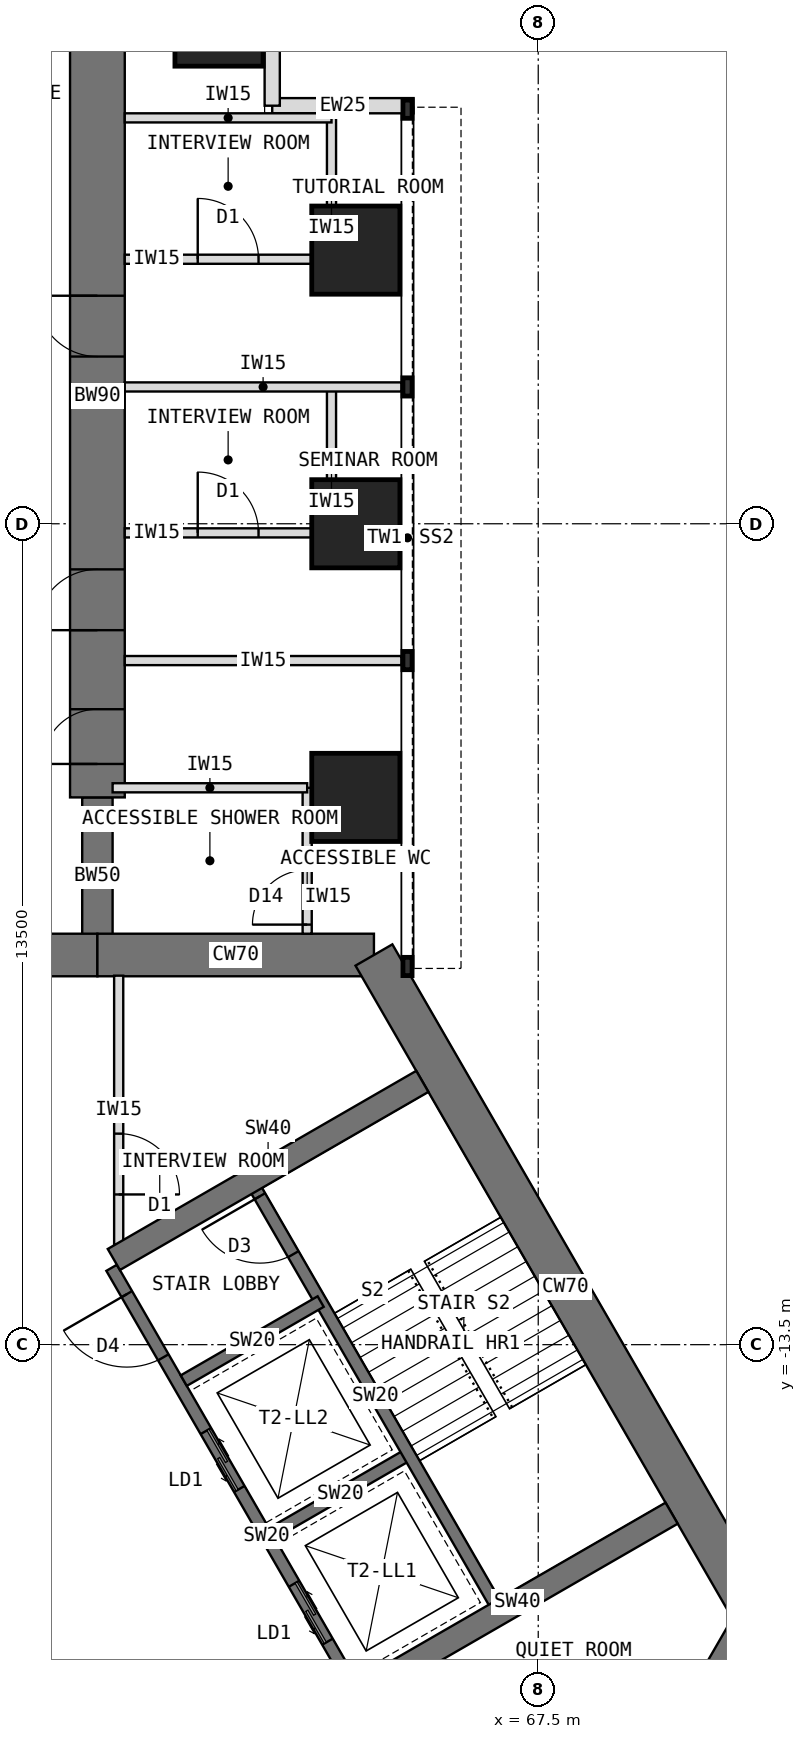
"""IFC4 building model, lengths in metres.
Left out: names, types, materials, properties, quantities, classifications, styles, units other than length and angle.
Written with IfcOpenShell. Run it as: python <this file> out.ifc"""

import sys

from ifc_helpers import new_model, si_unit, direction, frame, frame_2d, origin, origin_2d, place, context, subcontext, project, spatial, rectangle, extrude, element, fill, save


model = new_model("IFC4")
c1 = context("Model", 3, precision=1e-05, world=origin(), true_north=direction((0.0, 1.0)))
c2 = subcontext(c1, "Body", "Model", "MODEL_VIEW")
j1 = project(units=[si_unit("LENGTHUNIT", "METRE"), si_unit("PLANEANGLEUNIT", "RADIAN")], contexts=[c1])
p1 = place(None, origin())
s1 = spatial("IfcSite", under=j1, at=p1, CompositionType="ELEMENT")
p2 = place(p1, origin())
s2 = spatial("IfcBuilding", under=s1, at=p2, CompositionType="ELEMENT")
p3 = place(p2, frame((0.0, 0.0, 68.5)))
s3 = spatial("IfcBuildingStorey", under=s2, at=p3, CompositionType="ELEMENT", Elevation=68.5)
p4 = place(p3, frame((64.798, -7.092, 0.0), z_axis=(0.0, 0.0, 1.0), x_axis=(-1.0, 0.0, 0.0)))
e1 = element("IfcWall", 1, at=p4, inside=s3, PredefinedType="SHEAR", context=c2, shape_type="SweptSolid", body=[
    extrude(rectangle(XDim=4.548, YDim=0.7, at=frame_2d((2.274, 0.0))), origin(), (0.0, 0.0, 1.0), 4.0),
])
p5 = place(p3, frame((60.25, -7.092, 0.0), z_axis=(0.0, 0.0, 1.0), x_axis=(-1.0, 0.0, 0.0)))
e2 = element("IfcWall", 2, at=p5, inside=s3, PredefinedType="SHEAR", context=c2, shape_type="SweptSolid", body=[
    extrude(rectangle(XDim=3.5, YDim=0.7, at=frame_2d((1.75, 0.0))), origin(), (0.0, 0.0, 1.0), 4.0),
])
p6 = place(p5, frame((0.85, 0.0, 0.0)))
e3 = element("IfcOpeningElement", 3, at=p6, cuts=e2, PredefinedType="OPENING", context=c2, shape_type="SweptSolid", body=[
    extrude(rectangle(XDim=1.8, YDim=2.1, at=frame_2d((0.9, 1.05))), frame((0.0, 0.36, 0.0), z_axis=(0.0, -1.0, 0.0), x_axis=(1.0, 0.0, 0.0)), (0.0, 0.0, 1.0), 0.72),
])
p7 = place(p3, frame((68.822, -21.939, 0.0), z_axis=(0.0, 0.0, 1.0), x_axis=(0.500024481964, 0.866011268655, 0.0)))
e4 = element("IfcWall", 4, at=p7, inside=s3, PredefinedType="SHEAR", context=c2, shape_type="SweptSolid", body=[
    extrude(rectangle(XDim=4.548, YDim=0.7, at=frame_2d((2.274, 0.0))), origin(), (0.0, 0.0, 1.0), 4.0),
])
p8 = place(p3, frame((71.096, -18.0, 0.0), z_axis=(0.0, 0.0, 1.0), x_axis=(-0.500005998175, 0.866021940709, 0.0)))
e5 = element("IfcWall", 5, at=p8, inside=s3, PredefinedType="SHEAR", context=c2, shape_type="SweptSolid", body=[
    extrude(rectangle(XDim=12.596, YDim=0.7, at=frame_2d((6.298, 0.0))), origin(), (0.0, 0.0, 1.0), 4.0),
])
p9 = place(p3, frame((60.25, -7.092, 0.0), z_axis=(0.0, 0.0, 1.0), x_axis=(0.0, 1.0, 0.0)))
e6 = element("IfcWall", 6, at=p9, inside=s3, PredefinedType="SHEAR", context=c2, shape_type="SweptSolid", body=[
    extrude(rectangle(XDim=2.592, YDim=0.5, at=frame_2d((1.296, 0.0))), origin(), (0.0, 0.0, 1.0), 4.0),
])
p10 = place(p3, frame((60.25, -4.5, 0.0), z_axis=(0.0, 0.0, 1.0), x_axis=(0.0, 1.0, 0.0)))
e7 = element("IfcWall", 7, at=p10, inside=s3, PredefinedType="SHEAR", context=c2, shape_type="SweptSolid", body=[
    extrude(rectangle(XDim=13.2, YDim=0.9, at=frame_2d((6.6, 0.0))), origin(), (0.0, 0.0, 1.0), 4.0),
])
p11 = place(p10, frame((0.55, 0.0, 0.0)))
e8 = element("IfcOpeningElement", 8, at=p11, cuts=e7, PredefinedType="OPENING", context=c2, shape_type="SweptSolid", body=[
    extrude(rectangle(XDim=0.9, YDim=2.1, at=frame_2d((0.45, 1.05))), frame((0.0, 0.46, 0.0), z_axis=(0.0, -1.0, 0.0), x_axis=(1.0, 0.0, 0.0)), (0.0, 0.0, 1.0), 0.92),
])
p12 = place(p10, frame((2.75, 0.0, 0.0)))
e9 = element("IfcOpeningElement", 9, at=p12, cuts=e7, PredefinedType="OPENING", context=c2, shape_type="SweptSolid", body=[
    extrude(rectangle(XDim=1.0, YDim=2.1, at=frame_2d((0.5, 1.05))), frame((0.0, 0.46, 0.0), z_axis=(0.0, -1.0, 0.0), x_axis=(1.0, 0.0, 0.0)), (0.0, 0.0, 1.0), 0.92),
])
p13 = place(p10, frame((7.25, 0.0, 0.0)))
e10 = element("IfcOpeningElement", 10, at=p13, cuts=e7, PredefinedType="OPENING", context=c2, shape_type="SweptSolid", body=[
    extrude(rectangle(XDim=1.0, YDim=2.1, at=frame_2d((0.5, 1.05))), frame((0.0, 0.46, 0.0), z_axis=(0.0, -1.0, 0.0), x_axis=(1.0, 0.0, 0.0)), (0.0, 0.0, 1.0), 0.92),
])
for number, where, z_axis, x_axis in (
    (11, (64.5, -4.5, 0.0), (0.0, 0.0, 1.0), (1.0, 0.0, 0.0)),
    (12, (64.5, 0.0, 0.0), (0.0, 0.0, 1.0), (1.0, 0.0, 0.0)),
    (13, (64.5, 4.5, 0.0), (0.0, 0.0, 1.0), (1.0, 0.0, 0.0)),
    (14, (62.25, 8.25, 0.0), (0.0, 0.0, 1.0), (1.0, 0.0, 0.0)),
):
    element("IfcColumn", number, at=place(p3, frame(where, z_axis=z_axis, x_axis=x_axis)), inside=s3, PredefinedType="COLUMN", context=c2, shape_type="SweptSolid", body=[
        extrude(rectangle(XDim=1.45, YDim=1.45, at=origin_2d()), origin(), (0.0, 0.0, 1.0), 4.0),
    ])
for number, where, z_axis, x_axis in (
    (15, (65.45, 6.875, 0.0), (0.0, 0.0, 1.0), (-1.0, 0.0, 0.0)),
    (16, (63.125, 6.875, 0.0), (0.0, 0.0, 1.0), (0.0, 1.0, 0.0)),
):
    element("IfcWall", number, at=place(p3, frame(where, z_axis=z_axis, x_axis=x_axis)), inside=s3, PredefinedType="STANDARD", context=c2, shape_type="SweptSolid", body=[
        extrude(rectangle(XDim=2.325, YDim=0.25, at=frame_2d((1.163, 0.0))), origin(), (0.0, 0.0, 1.0), 3.8),
    ])
p14 = place(p3, frame((64.484, -19.164, 0.0), z_axis=(0.0, 0.0, 1.0), x_axis=(-0.49999894854, 0.866026010844, 0.0)))
e17 = element("IfcWall", 17, at=p14, inside=s3, PredefinedType="SHEAR", context=c2, shape_type="SweptSolid", body=[
    extrude(rectangle(XDim=8.0, YDim=0.2, at=frame_2d((4.0, 0.0))), origin(), (0.0, 0.0, 1.0), 4.0),
])
p15 = place(p14, frame((6.3, 0.0, 0.0)))
e18 = element("IfcOpeningElement", 18, at=p15, cuts=e17, PredefinedType="OPENING", context=c2, shape_type="SweptSolid", body=[
    extrude(rectangle(XDim=1.2, YDim=2.1, at=frame_2d((0.6, 1.05))), frame((0.0, 0.11, 0.0), z_axis=(0.0, -1.0, 0.0), x_axis=(1.0, 0.0, 0.0)), (0.0, 0.0, 1.0), 0.22),
])
p16 = place(p14, frame((0.9, 0.0, 0.0)))
e19 = element("IfcOpeningElement", 19, at=p16, cuts=e17, PredefinedType="OPENING", context=c2, shape_type="SweptSolid", body=[
    extrude(rectangle(XDim=1.1, YDim=2.2, at=frame_2d((0.55, 1.1))), frame((0.0, 0.11, 0.0), z_axis=(0.0, -1.0, 0.0), x_axis=(1.0, 0.0, 0.0)), (0.0, 0.0, 1.0), 0.22),
])
p17 = place(p14, frame((3.8, 0.0, 0.0)))
e20 = element("IfcOpeningElement", 20, at=p17, cuts=e17, PredefinedType="OPENING", context=c2, shape_type="SweptSolid", body=[
    extrude(rectangle(XDim=1.1, YDim=2.2, at=frame_2d((0.55, 1.1))), frame((0.0, 0.11, 0.0), z_axis=(0.0, -1.0, 0.0), x_axis=(1.0, 0.0, 0.0)), (0.0, 0.0, 1.0), 0.22),
])
p18 = place(p3, frame((63.12, -16.603, 0.0), z_axis=(0.0, 0.0, 1.0), x_axis=(0.866062058628, 0.499936506574, 0.0)))
e21 = element("IfcWall", 21, at=p18, inside=s3, PredefinedType="SHEAR", context=c2, shape_type="SweptSolid", body=[
    extrude(rectangle(XDim=2.6, YDim=0.2, at=frame_2d((1.3, 0.0))), origin(), (0.0, 0.0, 1.0), 4.0),
])
p19 = place(p3, frame((61.67, -14.091, 0.0), z_axis=(0.0, 0.0, 1.0), x_axis=(0.86603858612, 0.49997716683, 0.0)))
e22 = element("IfcWall", 22, at=p19, inside=s3, PredefinedType="SHEAR", context=c2, shape_type="SweptSolid", body=[
    extrude(rectangle(XDim=2.6, YDim=0.2, at=frame_2d((1.3, 0.0))), origin(), (0.0, 0.0, 1.0), 4.0),
])
p20 = place(p3, frame((66.822, -17.814, 0.0), z_axis=(0.0, 0.0, 1.0), x_axis=(-0.49999894854, 0.866026010844, 0.0)))
e23 = element("IfcWall", 23, at=p20, inside=s3, PredefinedType="SHEAR", context=c2, shape_type="SweptSolid", body=[
    extrude(rectangle(XDim=8.0, YDim=0.2, at=frame_2d((4.0, 0.0))), origin(), (0.0, 0.0, 1.0), 4.0),
])
p21 = place(p20, frame((6.7, 0.0, 0.0)))
e24 = element("IfcOpeningElement", 24, at=p21, cuts=e23, PredefinedType="OPENING", context=c2, shape_type="SweptSolid", body=[
    extrude(rectangle(XDim=1.1, YDim=2.1, at=frame_2d((0.55, 1.05))), frame((0.0, 0.11, 0.0), z_axis=(0.0, -1.0, 0.0), x_axis=(1.0, 0.0, 0.0)), (0.0, 0.0, 1.0), 0.22),
])
for number, where, z_axis, x_axis in (
    (25, (60.52, -12.099, 0.0), (0.0, 0.0, 1.0), (0.866, 0.5, 0.0)),
    (26, (64.62, -19.201, 0.0), (0.0, 0.0, 1.0), (0.866, 0.5, 0.0)),
):
    element("IfcWall", number, at=place(p3, frame(where, z_axis=z_axis, x_axis=x_axis)), inside=s3, PredefinedType="SHEAR", context=c2, shape_type="SweptSolid", body=[
        extrude(rectangle(XDim=5.858, YDim=0.4, at=frame_2d((2.929, 0.0))), origin(), (0.0, 0.0, 1.0), 4.0),
    ])
for number, where, z_axis, x_axis in (
    (27, (60.7, -2.25, 0.0), (0.0, 0.0, 1.0), (1.0, 0.0, 0.0)),
    (28, (60.7, 2.25, 0.0), (0.0, 0.0, 1.0), (1.0, 0.0, 0.0)),
):
    element("IfcWall", number, at=place(p3, frame(where, z_axis=z_axis, x_axis=x_axis)), inside=s3, PredefinedType="PARTITIONING", context=c2, shape_type="SweptSolid", body=[
        extrude(rectangle(XDim=4.55, YDim=0.15, at=frame_2d((2.275, 0.0))), origin(), (0.0, 0.0, 1.0), 3.8),
    ])
p22 = place(p3, frame((64.1, -0.15, 0.0), z_axis=(0.0, 0.0, 1.0), x_axis=(0.0, 1.0, 0.0)))
e29 = element("IfcWall", 29, at=p22, inside=s3, PredefinedType="PARTITIONING", context=c2, shape_type="SweptSolid", body=[
    extrude(rectangle(XDim=2.4, YDim=0.15, at=frame_2d((1.2, 0.0))), origin(), (0.0, 0.0, 1.0), 3.8),
])
p23 = place(p3, frame((60.7, -0.15, 0.0), z_axis=(0.0, 0.0, 1.0), x_axis=(1.0, 0.0, 0.0)))
e30 = element("IfcWall", 30, at=p23, inside=s3, PredefinedType="PARTITIONING", context=c2, shape_type="SweptSolid", body=[
    extrude(rectangle(XDim=3.4, YDim=0.15, at=frame_2d((1.7, 0.0))), origin(), (0.0, 0.0, 1.0), 3.8),
])
p24 = place(p23, frame((1.2, 0.0, 0.0)))
e31 = element("IfcOpeningElement", 31, at=p24, cuts=e30, PredefinedType="OPENING", context=c2, shape_type="SweptSolid", body=[
    extrude(rectangle(XDim=1.0, YDim=2.1, at=frame_2d((0.5, 1.05))), frame((0.0, 0.085, 0.0), z_axis=(0.0, -1.0, 0.0), x_axis=(1.0, 0.0, 0.0)), (0.0, 0.0, 1.0), 0.17),
])
p25 = place(p3, frame((64.1, 4.35, 0.0), z_axis=(0.0, 0.0, 1.0), x_axis=(0.0, 1.0, 0.0)))
e32 = element("IfcWall", 32, at=p25, inside=s3, PredefinedType="PARTITIONING", context=c2, shape_type="SweptSolid", body=[
    extrude(rectangle(XDim=2.4, YDim=0.15, at=frame_2d((1.2, 0.0))), origin(), (0.0, 0.0, 1.0), 3.8),
])
p26 = place(p3, frame((60.7, 4.35, 0.0), z_axis=(0.0, 0.0, 1.0), x_axis=(1.0, 0.0, 0.0)))
e33 = element("IfcWall", 33, at=p26, inside=s3, PredefinedType="PARTITIONING", context=c2, shape_type="SweptSolid", body=[
    extrude(rectangle(XDim=3.4, YDim=0.15, at=frame_2d((1.7, 0.0))), origin(), (0.0, 0.0, 1.0), 3.8),
])
p27 = place(p26, frame((1.2, 0.0, 0.0)))
e34 = element("IfcOpeningElement", 34, at=p27, cuts=e33, PredefinedType="OPENING", context=c2, shape_type="SweptSolid", body=[
    extrude(rectangle(XDim=1.0, YDim=2.1, at=frame_2d((0.5, 1.05))), frame((0.0, 0.085, 0.0), z_axis=(0.0, -1.0, 0.0), x_axis=(1.0, 0.0, 0.0)), (0.0, 0.0, 1.0), 0.17),
])
p28 = place(p3, frame((60.7, 6.675, 0.0), z_axis=(0.0, 0.0, 1.0), x_axis=(1.0, 0.0, 0.0)))
e35 = element("IfcWall", 35, at=p28, inside=s3, PredefinedType="PARTITIONING", context=c2, shape_type="SweptSolid", body=[
    extrude(rectangle(XDim=3.4, YDim=0.15, at=frame_2d((1.7, 0.0))), origin(), (0.0, 0.0, 1.0), 3.8),
])
p29 = place(p3, frame((63.7, -6.742, 0.0), z_axis=(0.0, 0.0, 1.0), x_axis=(0.0, 1.0, 0.0)))
e36 = element("IfcWall", 36, at=p29, inside=s3, PredefinedType="PARTITIONING", context=c2, shape_type="SweptSolid", body=[
    extrude(rectangle(XDim=2.4, YDim=0.15, at=frame_2d((1.2, 0.0))), origin(), (0.0, 0.0, 1.0), 3.8),
])
p30 = place(p29, frame((0.15, 0.0, 0.0)))
e37 = element("IfcOpeningElement", 37, at=p30, cuts=e36, PredefinedType="OPENING", context=c2, shape_type="SweptSolid", body=[
    extrude(rectangle(XDim=0.9, YDim=2.1, at=frame_2d((0.45, 1.05))), frame((0.0, 0.085, 0.0), z_axis=(0.0, -1.0, 0.0), x_axis=(1.0, 0.0, 0.0)), (0.0, 0.0, 1.0), 0.17),
])
p31 = place(p3, frame((60.5, -4.342, 0.0), z_axis=(0.0, 0.0, 1.0), x_axis=(1.0, 0.0, 0.0)))
e38 = element("IfcWall", 38, at=p31, inside=s3, PredefinedType="PARTITIONING", context=c2, shape_type="SweptSolid", body=[
    extrude(rectangle(XDim=3.2, YDim=0.15, at=frame_2d((1.6, 0.0))), origin(), (0.0, 0.0, 1.0), 3.8),
])
p32 = place(p3, frame((60.6, -7.432, 0.0), z_axis=(0.0, 0.0, 1.0), x_axis=(0.0, -1.0, 0.0)))
e39 = element("IfcWall", 39, at=p32, inside=s3, PredefinedType="PARTITIONING", context=c2, shape_type="SweptSolid", body=[
    extrude(rectangle(XDim=4.426, YDim=0.15, at=frame_2d((2.213, 0.0))), origin(), (0.0, 0.0, 1.0), 3.8),
])
p33 = place(p32, frame((2.598, 0.0, 0.0)))
e40 = element("IfcOpeningElement", 40, at=p33, cuts=e39, PredefinedType="OPENING", context=c2, shape_type="SweptSolid", body=[
    extrude(rectangle(XDim=1.0, YDim=2.1, at=frame_2d((0.5, 1.05))), frame((0.0, 0.085, 0.0), z_axis=(0.0, -1.0, 0.0), x_axis=(1.0, 0.0, 0.0)), (0.0, 0.0, 1.0), 0.17),
])
p34 = place(p15, origin())
e41 = element("IfcDoor", 41, at=p34, inside=s3, OperationType="SINGLE_SWING_RIGHT", PredefinedType="DOOR", context=c2, shape_type="SweptSolid", body=[
    extrude(rectangle(XDim=1.2, YDim=2.1, at=frame_2d((0.6, 1.05))), frame((0.0, 0.025, 0.0), z_axis=(0.0, -1.0, 0.0), x_axis=(1.0, 0.0, 0.0)), (0.0, 0.0, 1.0), 0.05),
])
fill(e18, e41)
p35 = place(p16, origin())
e42 = element("IfcDoor", 42, at=p35, inside=s3, OperationType="DOUBLE_DOOR_SLIDING", PredefinedType="DOOR", context=c2, shape_type="SweptSolid", body=[
    extrude(rectangle(XDim=1.1, YDim=2.2, at=frame_2d((0.55, 1.1))), frame((0.0, 0.025, 0.0), z_axis=(0.0, -1.0, 0.0), x_axis=(1.0, 0.0, 0.0)), (0.0, 0.0, 1.0), 0.05),
])
fill(e19, e42)
p36 = place(p17, origin())
e43 = element("IfcDoor", 43, at=p36, inside=s3, OperationType="DOUBLE_DOOR_SLIDING", PredefinedType="DOOR", context=c2, shape_type="SweptSolid", body=[
    extrude(rectangle(XDim=1.1, YDim=2.2, at=frame_2d((0.55, 1.1))), frame((0.0, 0.025, 0.0), z_axis=(0.0, -1.0, 0.0), x_axis=(1.0, 0.0, 0.0)), (0.0, 0.0, 1.0), 0.05),
])
fill(e20, e43)
p37 = place(p21, origin())
e44 = element("IfcDoor", 44, at=p37, inside=s3, OperationType="SINGLE_SWING_RIGHT", PredefinedType="DOOR", context=c2, shape_type="SweptSolid", body=[
    extrude(rectangle(XDim=1.1, YDim=2.1, at=frame_2d((0.55, 1.05))), frame((0.0, 0.025, 0.0), z_axis=(0.0, -1.0, 0.0), x_axis=(1.0, 0.0, 0.0)), (0.0, 0.0, 1.0), 0.05),
])
fill(e24, e44)
p38 = place(p24, origin())
e45 = element("IfcDoor", 45, at=p38, inside=s3, OperationType="SINGLE_SWING_LEFT", PredefinedType="DOOR", context=c2, shape_type="SweptSolid", body=[
    extrude(rectangle(XDim=1.0, YDim=2.1, at=frame_2d((0.5, 1.05))), frame((0.0, 0.025, 0.0), z_axis=(0.0, -1.0, 0.0), x_axis=(1.0, 0.0, 0.0)), (0.0, 0.0, 1.0), 0.05),
])
fill(e31, e45)
p39 = place(p27, origin())
e46 = element("IfcDoor", 46, at=p39, inside=s3, OperationType="SINGLE_SWING_LEFT", PredefinedType="DOOR", context=c2, shape_type="SweptSolid", body=[
    extrude(rectangle(XDim=1.0, YDim=2.1, at=frame_2d((0.5, 1.05))), frame((0.0, 0.025, 0.0), z_axis=(0.0, -1.0, 0.0), x_axis=(1.0, 0.0, 0.0)), (0.0, 0.0, 1.0), 0.05),
])
fill(e34, e46)
p40 = place(p30, origin())
e47 = element("IfcDoor", 47, at=p40, inside=s3, OperationType="SINGLE_SWING_LEFT", PredefinedType="DOOR", context=c2, shape_type="SweptSolid", body=[
    extrude(rectangle(XDim=0.9, YDim=2.1, at=frame_2d((0.45, 1.05))), frame((0.0, 0.025, 0.0), z_axis=(0.0, -1.0, 0.0), x_axis=(1.0, 0.0, 0.0)), (0.0, 0.0, 1.0), 0.05),
])
fill(e37, e47)
p41 = place(p33, origin())
e48 = element("IfcDoor", 48, at=p41, inside=s3, OperationType="SINGLE_SWING_RIGHT", PredefinedType="DOOR", context=c2, shape_type="SweptSolid", body=[
    extrude(rectangle(XDim=1.0, YDim=2.1, at=frame_2d((0.5, 1.05))), frame((0.0, 0.025, 0.0), z_axis=(0.0, -1.0, 0.0), x_axis=(1.0, 0.0, 0.0)), (0.0, 0.0, 1.0), 0.05),
])
fill(e40, e48)
p42 = place(p11, origin())
e49 = element("IfcDoor", 49, at=p42, inside=s3, OperationType="SINGLE_SWING_LEFT", PredefinedType="DOOR", context=c2, shape_type="SweptSolid", body=[
    extrude(rectangle(XDim=0.82, YDim=2.06, at=frame_2d((0.45, 1.03))), frame((0.0, 0.025, 0.0), z_axis=(0.0, -1.0, 0.0), x_axis=(1.0, 0.0, 0.0)), (0.0, 0.0, 1.0), 0.05),
    extrude(rectangle(XDim=0.04, YDim=2.1, at=frame_2d((0.02, 1.05))), frame((0.0, 0.45, 0.0), z_axis=(0.0, -1.0, 0.0), x_axis=(1.0, 0.0, 0.0)), (0.0, 0.0, 1.0), 0.899),
    extrude(rectangle(XDim=0.04, YDim=2.1, at=frame_2d((0.88, 1.05))), frame((0.0, 0.45, 0.0), z_axis=(0.0, -1.0, 0.0), x_axis=(1.0, 0.0, 0.0)), (0.0, 0.0, 1.0), 0.899),
    extrude(rectangle(XDim=0.82, YDim=0.04, at=frame_2d((0.45, 2.08))), frame((0.0, 0.45, 0.0), z_axis=(0.0, -1.0, 0.0), x_axis=(1.0, 0.0, 0.0)), (0.0, 0.0, 1.0), 0.899),
])
fill(e8, e49)
p43 = place(p12, origin())
e50 = element("IfcDoor", 50, at=p43, inside=s3, OperationType="SINGLE_SWING_LEFT", PredefinedType="DOOR", context=c2, shape_type="SweptSolid", body=[
    extrude(rectangle(XDim=0.92, YDim=2.06, at=frame_2d((0.5, 1.03))), frame((0.0, 0.025, 0.0), z_axis=(0.0, -1.0, 0.0), x_axis=(1.0, 0.0, 0.0)), (0.0, 0.0, 1.0), 0.05),
    extrude(rectangle(XDim=0.04, YDim=2.1, at=frame_2d((0.02, 1.05))), frame((0.0, 0.45, 0.0), z_axis=(0.0, -1.0, 0.0), x_axis=(1.0, 0.0, 0.0)), (0.0, 0.0, 1.0), 0.899),
    extrude(rectangle(XDim=0.04, YDim=2.1, at=frame_2d((0.98, 1.05))), frame((0.0, 0.45, 0.0), z_axis=(0.0, -1.0, 0.0), x_axis=(1.0, 0.0, 0.0)), (0.0, 0.0, 1.0), 0.899),
    extrude(rectangle(XDim=0.92, YDim=0.04, at=frame_2d((0.5, 2.08))), frame((0.0, 0.45, 0.0), z_axis=(0.0, -1.0, 0.0), x_axis=(1.0, 0.0, 0.0)), (0.0, 0.0, 1.0), 0.899),
])
fill(e9, e50)
p44 = place(p13, origin())
e51 = element("IfcDoor", 51, at=p44, inside=s3, OperationType="SINGLE_SWING_RIGHT", PredefinedType="DOOR", context=c2, shape_type="SweptSolid", body=[
    extrude(rectangle(XDim=0.92, YDim=2.06, at=frame_2d((0.5, 1.03))), frame((0.0, 0.025, 0.0), z_axis=(0.0, -1.0, 0.0), x_axis=(1.0, 0.0, 0.0)), (0.0, 0.0, 1.0), 0.05),
    extrude(rectangle(XDim=0.04, YDim=2.1, at=frame_2d((0.02, 1.05))), frame((0.0, 0.45, 0.0), z_axis=(0.0, -1.0, 0.0), x_axis=(1.0, 0.0, 0.0)), (0.0, 0.0, 1.0), 0.899),
    extrude(rectangle(XDim=0.04, YDim=2.1, at=frame_2d((0.98, 1.05))), frame((0.0, 0.45, 0.0), z_axis=(0.0, -1.0, 0.0), x_axis=(1.0, 0.0, 0.0)), (0.0, 0.0, 1.0), 0.899),
    extrude(rectangle(XDim=0.92, YDim=0.04, at=frame_2d((0.5, 2.08))), frame((0.0, 0.45, 0.0), z_axis=(0.0, -1.0, 0.0), x_axis=(1.0, 0.0, 0.0)), (0.0, 0.0, 1.0), 0.899),
])
fill(e10, e51)
save(model, sys.argv[1])
